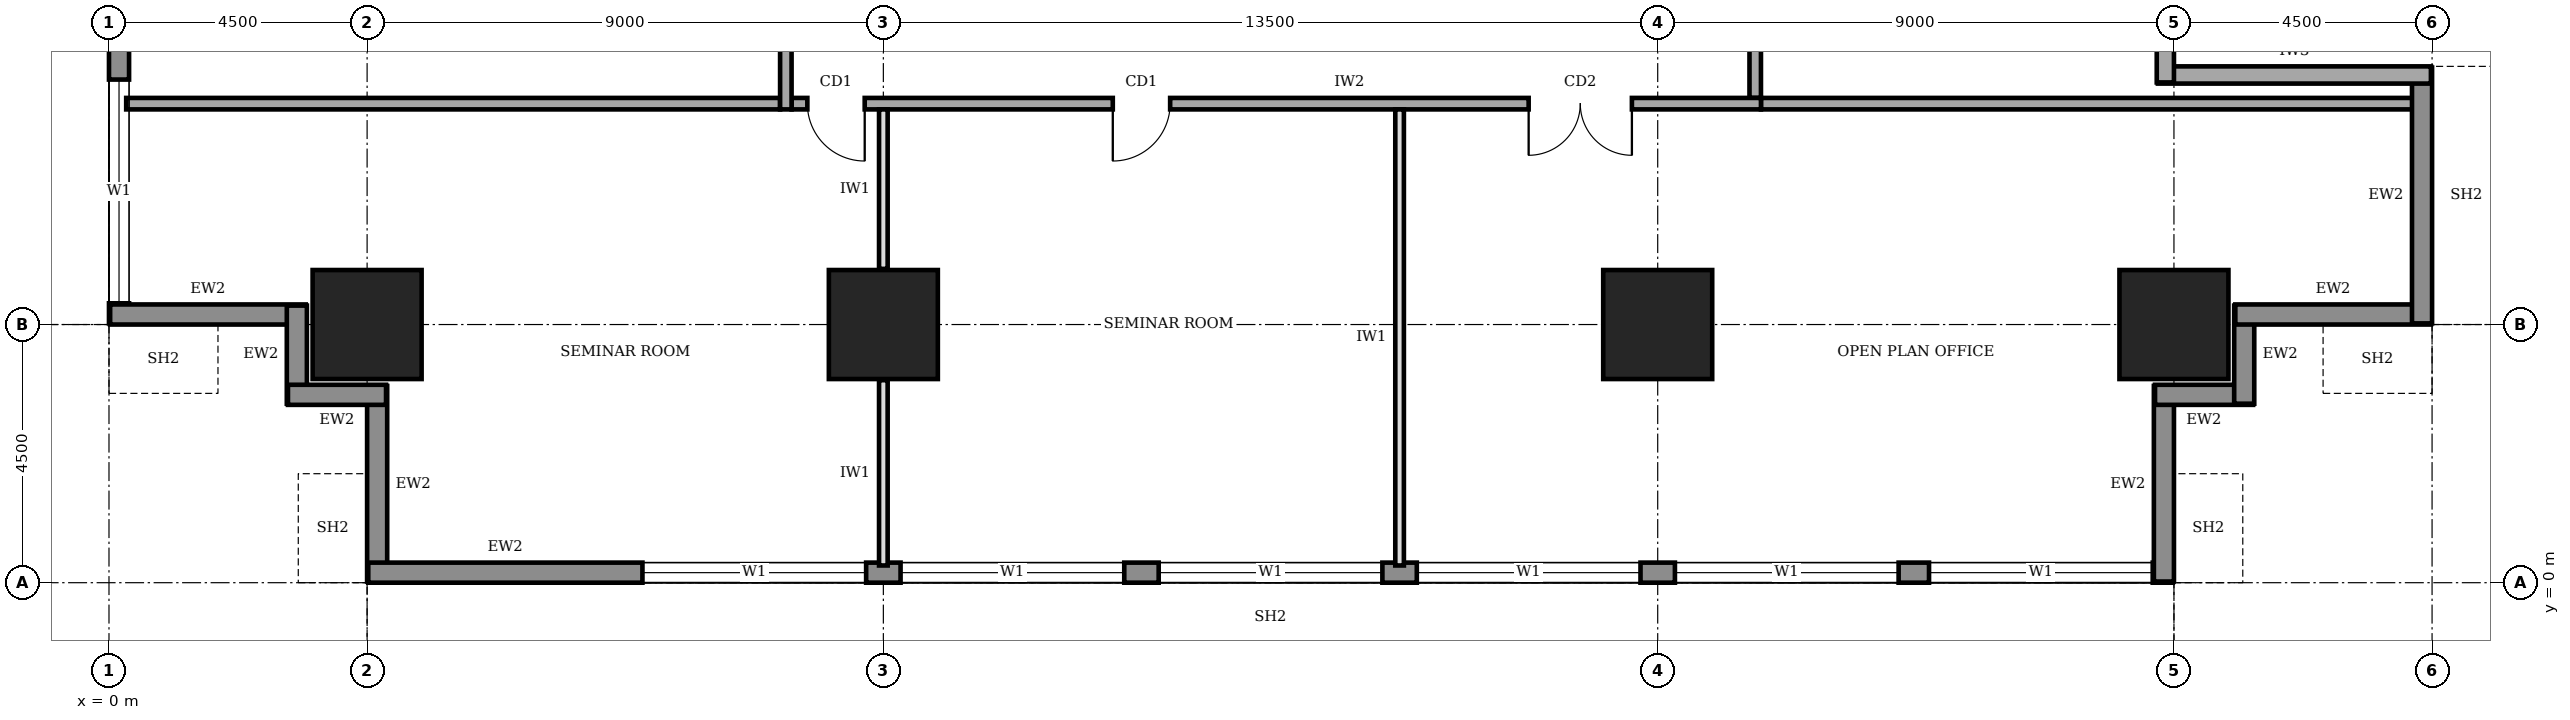
"""IFC4 building model, lengths in metres.
Left out: names, types, materials, properties, quantities, classifications, styles, units other than length and angle.
Written with IfcOpenShell. Run it as: python <this file> out.ifc"""

import sys

from ifc_helpers import new_model, si_unit, direction, frame, frame_2d, origin, origin_2d, place, context, subcontext, project, spatial, rectangle, extrude, element, fill, save


model = new_model("IFC4")
c1 = context("Model", 3, precision=1e-05, world=origin(), true_north=direction((0.0, 1.0)))
c2 = subcontext(c1, "Body", "Model", "MODEL_VIEW")
j1 = project(units=[si_unit("LENGTHUNIT", "METRE"), si_unit("PLANEANGLEUNIT", "RADIAN")], contexts=[c1])
p1 = place(None, origin())
s1 = spatial("IfcSite", under=j1, at=p1, CompositionType="ELEMENT")
p2 = place(p1, origin())
s2 = spatial("IfcBuilding", under=s1, at=p2, CompositionType="ELEMENT")
p3 = place(p2, frame((0.0, 0.0, 105.0)))
s3 = spatial("IfcBuildingStorey", under=s2, at=p3, CompositionType="ELEMENT", Elevation=105.0)
for number, where, z_axis, x_axis in (
    (1, (4.5, 4.5, 0.0), (0.0, 0.0, 1.0), (1.0, 0.0, 0.0)),
    (2, (13.5, 4.5, 0.0), (0.0, 0.0, 1.0), (1.0, 0.0, 0.0)),
    (3, (27.0, 4.5, 0.0), (0.0, 0.0, 1.0), (1.0, 0.0, 0.0)),
    (4, (36.0, 4.5, 0.0), (0.0, 0.0, 1.0), (1.0, 0.0, 0.0)),
):
    element("IfcColumn", number, at=place(p3, frame(where, z_axis=z_axis, x_axis=x_axis)), inside=s3, PredefinedType="COLUMN", context=c2, shape_type="SweptSolid", body=[
        extrude(rectangle(XDim=1.9, YDim=1.9, at=origin_2d()), origin(), (0.0, 0.0, 1.0), 4.0),
    ])
p4 = place(p3, frame((4.675, 3.43, 0.0), z_axis=(0.0, 0.0, 1.0), x_axis=(0.0, -1.0, 0.0)))
e5 = element("IfcWall", 5, at=p4, inside=s3, PredefinedType="STANDARD", context=c2, shape_type="SweptSolid", body=[
    extrude(rectangle(XDim=3.41, YDim=0.35, at=frame_2d((1.705, 0.0))), origin(), (0.0, 0.0, 1.0), 2.85),
])
p5 = place(p3, frame((4.52, 0.175, 0.0), z_axis=(0.0, 0.0, 1.0), x_axis=(1.0, 0.0, 0.0)))
e6 = element("IfcWall", 6, at=p5, inside=s3, PredefinedType="STANDARD", context=c2, shape_type="SweptSolid", body=[
    extrude(rectangle(XDim=31.46, YDim=0.35, at=frame_2d((15.73, 0.0))), origin(), (0.0, 0.0, 1.0), 3.75),
])
p6 = place(p5, frame((4.78, 0.0, 0.9)))
e7 = element("IfcOpeningElement", 7, at=p6, cuts=e6, PredefinedType="OPENING", context=c2, shape_type="SweptSolid", body=[
    extrude(rectangle(XDim=3.9, YDim=2.2, at=frame_2d((1.95, 1.1))), frame((0.0, 0.185, 0.0), z_axis=(0.0, -1.0, 0.0), x_axis=(1.0, 0.0, 0.0)), (0.0, 0.0, 1.0), 0.37),
])
p7 = place(p5, frame((9.28, 0.0, 0.9)))
e8 = element("IfcOpeningElement", 8, at=p7, cuts=e6, PredefinedType="OPENING", context=c2, shape_type="SweptSolid", body=[
    extrude(rectangle(XDim=3.9, YDim=2.2, at=frame_2d((1.95, 1.1))), frame((0.0, 0.185, 0.0), z_axis=(0.0, -1.0, 0.0), x_axis=(1.0, 0.0, 0.0)), (0.0, 0.0, 1.0), 0.37),
])
p8 = place(p5, frame((13.78, 0.0, 0.9)))
e9 = element("IfcOpeningElement", 9, at=p8, cuts=e6, PredefinedType="OPENING", context=c2, shape_type="SweptSolid", body=[
    extrude(rectangle(XDim=3.9, YDim=2.2, at=frame_2d((1.95, 1.1))), frame((0.0, 0.185, 0.0), z_axis=(0.0, -1.0, 0.0), x_axis=(1.0, 0.0, 0.0)), (0.0, 0.0, 1.0), 0.37),
])
p9 = place(p5, frame((18.28, 0.0, 0.9)))
e10 = element("IfcOpeningElement", 10, at=p9, cuts=e6, PredefinedType="OPENING", context=c2, shape_type="SweptSolid", body=[
    extrude(rectangle(XDim=3.9, YDim=2.2, at=frame_2d((1.95, 1.1))), frame((0.0, 0.185, 0.0), z_axis=(0.0, -1.0, 0.0), x_axis=(1.0, 0.0, 0.0)), (0.0, 0.0, 1.0), 0.37),
])
p10 = place(p5, frame((22.78, 0.0, 0.9)))
e11 = element("IfcOpeningElement", 11, at=p10, cuts=e6, PredefinedType="OPENING", context=c2, shape_type="SweptSolid", body=[
    extrude(rectangle(XDim=3.9, YDim=2.2, at=frame_2d((1.95, 1.1))), frame((0.0, 0.185, 0.0), z_axis=(0.0, -1.0, 0.0), x_axis=(1.0, 0.0, 0.0)), (0.0, 0.0, 1.0), 0.37),
])
p11 = place(p5, frame((27.21, 0.0, 0.9)))
e12 = element("IfcOpeningElement", 12, at=p11, cuts=e6, PredefinedType="OPENING", context=c2, shape_type="SweptSolid", body=[
    extrude(rectangle(XDim=3.9, YDim=2.2, at=frame_2d((1.95, 1.1))), frame((0.0, 0.185, 0.0), z_axis=(0.0, -1.0, 0.0), x_axis=(1.0, 0.0, 0.0)), (0.0, 0.0, 1.0), 0.37),
])
p12 = place(p3, frame((35.825, 0.02, 0.0), z_axis=(0.0, 0.0, 1.0), x_axis=(0.0, 1.0, 0.0)))
e13 = element("IfcWall", 13, at=p12, inside=s3, PredefinedType="STANDARD", context=c2, shape_type="SweptSolid", body=[
    extrude(rectangle(XDim=3.41, YDim=0.35, at=frame_2d((1.705, 0.0))), origin(), (0.0, 0.0, 1.0), 2.85),
])
for number, where, z_axis, x_axis in (
    (14, (35.67, 3.275, 0.0), (0.0, 0.0, 1.0), (1.0, 0.0, 0.0)),
    (15, (37.225, 3.12, 0.0), (0.0, 0.0, 1.0), (0.0, 1.0, 0.0)),
):
    element("IfcWall", number, at=place(p3, frame(where, z_axis=z_axis, x_axis=x_axis)), inside=s3, PredefinedType="STANDARD", context=c2, shape_type="SweptSolid", body=[
        extrude(rectangle(XDim=1.71, YDim=0.35, at=frame_2d((0.855, 0.0))), origin(), (0.0, 0.0, 1.0), 3.75),
    ])
p13 = place(p3, frame((37.07, 4.675, 0.0), z_axis=(0.0, 0.0, 1.0), x_axis=(1.0, 0.0, 0.0)))
e16 = element("IfcWall", 16, at=p13, inside=s3, PredefinedType="STANDARD", context=c2, shape_type="SweptSolid", body=[
    extrude(rectangle(XDim=3.41, YDim=0.35, at=frame_2d((1.705, 0.0))), origin(), (0.0, 0.0, 1.0), 2.85),
])
p14 = place(p3, frame((40.325, 4.52, 0.0), z_axis=(0.0, 0.0, 1.0), x_axis=(0.0, 1.0, 0.0)))
e17 = element("IfcWall", 17, at=p14, inside=s3, PredefinedType="STANDARD", context=c2, shape_type="SweptSolid", body=[
    extrude(rectangle(XDim=4.46, YDim=0.35, at=frame_2d((2.23, 0.0))), origin(), (0.0, 0.0, 1.0), 3.75),
])
p15 = place(p3, frame((40.48, 8.85, 0.0), z_axis=(0.0, 0.0, 1.0), x_axis=(-1.0, 0.0, 0.0)))
e18 = element("IfcWall", 18, at=p15, inside=s3, PredefinedType="SOLIDWALL", context=c2, shape_type="SweptSolid", body=[
    extrude(rectangle(XDim=4.76, YDim=0.3, at=frame_2d((2.38, 0.0))), origin(), (0.0, 0.0, 1.0), 3.75),
])
p16 = place(p3, frame((35.85, 8.72, 0.0), z_axis=(0.0, 0.0, 1.0), x_axis=(0.0, 1.0, 0.0)))
e19 = element("IfcWall", 19, at=p16, inside=s3, PredefinedType="SOLIDWALL", context=c2, shape_type="SweptSolid", body=[
    extrude(rectangle(XDim=1.38, YDim=0.3, at=frame_2d((0.69, 0.0))), origin(), (0.0, 0.0, 1.0), 2.65),
])
p17 = place(p3, frame((0.175, 35.98, 0.0), z_axis=(0.0, 0.0, 1.0), x_axis=(0.0, -1.0, 0.0)))
e20 = element("IfcWall", 20, at=p17, inside=s3, PredefinedType="STANDARD", context=c2, shape_type="SweptSolid", body=[
    extrude(rectangle(XDim=31.46, YDim=0.35, at=frame_2d((15.73, 0.0))), origin(), (0.0, 0.0, 1.0), 3.75),
])
p18 = place(p17, frame((27.21, 0.0, 0.9)))
e21 = element("IfcOpeningElement", 21, at=p18, cuts=e20, PredefinedType="OPENING", context=c2, shape_type="SweptSolid", body=[
    extrude(rectangle(XDim=3.9, YDim=2.2, at=frame_2d((1.95, 1.1))), frame((0.0, 0.185, 0.0), z_axis=(0.0, -1.0, 0.0), x_axis=(1.0, 0.0, 0.0)), (0.0, 0.0, 1.0), 0.37),
])
p19 = place(p17, frame((22.78, 0.0, 0.9)))
e22 = element("IfcOpeningElement", 22, at=p19, cuts=e20, PredefinedType="OPENING", context=c2, shape_type="SweptSolid", body=[
    extrude(rectangle(XDim=3.9, YDim=2.2, at=frame_2d((1.95, 1.1))), frame((0.0, 0.185, 0.0), z_axis=(0.0, -1.0, 0.0), x_axis=(1.0, 0.0, 0.0)), (0.0, 0.0, 1.0), 0.37),
])
p20 = place(p17, frame((18.28, 0.0, 0.9)))
e23 = element("IfcOpeningElement", 23, at=p20, cuts=e20, PredefinedType="OPENING", context=c2, shape_type="SweptSolid", body=[
    extrude(rectangle(XDim=3.9, YDim=2.2, at=frame_2d((1.95, 1.1))), frame((0.0, 0.185, 0.0), z_axis=(0.0, -1.0, 0.0), x_axis=(1.0, 0.0, 0.0)), (0.0, 0.0, 1.0), 0.37),
])
p21 = place(p17, frame((13.78, 0.0, 0.9)))
e24 = element("IfcOpeningElement", 24, at=p21, cuts=e20, PredefinedType="OPENING", context=c2, shape_type="SweptSolid", body=[
    extrude(rectangle(XDim=3.9, YDim=2.2, at=frame_2d((1.95, 1.1))), frame((0.0, 0.185, 0.0), z_axis=(0.0, -1.0, 0.0), x_axis=(1.0, 0.0, 0.0)), (0.0, 0.0, 1.0), 0.37),
])
p22 = place(p17, frame((9.28, 0.0, 0.9)))
e25 = element("IfcOpeningElement", 25, at=p22, cuts=e20, PredefinedType="OPENING", context=c2, shape_type="SweptSolid", body=[
    extrude(rectangle(XDim=3.9, YDim=2.2, at=frame_2d((1.95, 1.1))), frame((0.0, 0.185, 0.0), z_axis=(0.0, -1.0, 0.0), x_axis=(1.0, 0.0, 0.0)), (0.0, 0.0, 1.0), 0.37),
])
p23 = place(p17, frame((4.78, 0.0, 0.9)))
e26 = element("IfcOpeningElement", 26, at=p23, cuts=e20, PredefinedType="OPENING", context=c2, shape_type="SweptSolid", body=[
    extrude(rectangle(XDim=3.9, YDim=2.2, at=frame_2d((1.95, 1.1))), frame((0.0, 0.185, 0.0), z_axis=(0.0, -1.0, 0.0), x_axis=(1.0, 0.0, 0.0)), (0.0, 0.0, 1.0), 0.37),
])
p24 = place(p3, frame((0.02, 4.675, 0.0), z_axis=(0.0, 0.0, 1.0), x_axis=(1.0, 0.0, 0.0)))
e27 = element("IfcWall", 27, at=p24, inside=s3, PredefinedType="STANDARD", context=c2, shape_type="SweptSolid", body=[
    extrude(rectangle(XDim=3.41, YDim=0.35, at=frame_2d((1.705, 0.0))), origin(), (0.0, 0.0, 1.0), 2.85),
])
for number, where, z_axis, x_axis in (
    (28, (3.275, 4.83, 0.0), (0.0, 0.0, 1.0), (0.0, -1.0, 0.0)),
    (29, (3.12, 3.275, 0.0), (0.0, 0.0, 1.0), (1.0, 0.0, 0.0)),
):
    element("IfcWall", number, at=place(p3, frame(where, z_axis=z_axis, x_axis=x_axis)), inside=s3, PredefinedType="STANDARD", context=c2, shape_type="SweptSolid", body=[
        extrude(rectangle(XDim=1.71, YDim=0.35, at=frame_2d((0.855, 0.0))), origin(), (0.0, 0.0, 1.0), 3.75),
    ])
p25 = place(p3, frame((11.9, 8.35, 0.0), z_axis=(0.0, 0.0, 1.0), x_axis=(1.0, 0.0, 0.0)))
e30 = element("IfcWall", 30, at=p25, inside=s3, PredefinedType="SOLIDWALL", context=c2, shape_type="SweptSolid", body=[
    extrude(rectangle(XDim=16.9, YDim=0.2, at=frame_2d((8.45, 0.0))), origin(), (0.0, 0.0, 1.0), 3.75),
])
p26 = place(p25, frame((0.275, 0.0, 0.0)))
e31 = element("IfcOpeningElement", 31, at=p26, cuts=e30, PredefinedType="OPENING", context=c2, shape_type="SweptSolid", body=[
    extrude(rectangle(XDim=1.0, YDim=2.1, at=frame_2d((0.5, 1.05))), frame((0.0, 0.11, 0.0), z_axis=(0.0, -1.0, 0.0), x_axis=(1.0, 0.0, 0.0)), (0.0, 0.0, 1.0), 0.22),
])
p27 = place(p25, frame((5.6, 0.0, 0.0)))
e32 = element("IfcOpeningElement", 32, at=p27, cuts=e30, PredefinedType="OPENING", context=c2, shape_type="SweptSolid", body=[
    extrude(rectangle(XDim=1.0, YDim=2.1, at=frame_2d((0.5, 1.05))), frame((0.0, 0.11, 0.0), z_axis=(0.0, -1.0, 0.0), x_axis=(1.0, 0.0, 0.0)), (0.0, 0.0, 1.0), 0.22),
])
p28 = place(p25, frame((12.85, 0.0, 0.0)))
e33 = element("IfcOpeningElement", 33, at=p28, cuts=e30, PredefinedType="OPENING", context=c2, shape_type="SweptSolid", body=[
    extrude(rectangle(XDim=1.8, YDim=2.1, at=frame_2d((0.9, 1.05))), frame((0.0, 0.11, 0.0), z_axis=(0.0, -1.0, 0.0), x_axis=(1.0, 0.0, 0.0)), (0.0, 0.0, 1.0), 0.22),
])
p29 = place(p3, frame((28.7, 8.45, 0.0), z_axis=(0.0, 0.0, 1.0), x_axis=(0.0, 1.0, 0.0)))
e34 = element("IfcWall", 34, at=p29, inside=s3, PredefinedType="SOLIDWALL", context=c2, shape_type="SweptSolid", body=[
    extrude(rectangle(XDim=23.8, YDim=0.2, at=frame_2d((11.9, 0.0))), origin(), (0.0, 0.0, 1.0), 3.75),
])
p30 = place(p29, frame((10.9, 0.0, 0.0)))
e35 = element("IfcOpeningElement", 35, at=p30, cuts=e34, PredefinedType="OPENING", context=c2, shape_type="SweptSolid", body=[
    extrude(rectangle(XDim=1.8, YDim=2.1, at=frame_2d((0.9, 1.05))), frame((0.0, 0.11, 0.0), z_axis=(0.0, -1.0, 0.0), x_axis=(1.0, 0.0, 0.0)), (0.0, 0.0, 1.0), 0.22),
])
p31 = place(p3, frame((11.8, 32.05, 0.0), z_axis=(0.0, 0.0, 1.0), x_axis=(0.0, -1.0, 0.0)))
e36 = element("IfcWall", 36, at=p31, inside=s3, PredefinedType="SOLIDWALL", context=c2, shape_type="SweptSolid", body=[
    extrude(rectangle(XDim=23.8, YDim=0.2, at=frame_2d((11.9, 0.0))), origin(), (0.0, 0.0, 1.0), 3.75),
])
p32 = place(p31, frame((20.675, 0.0, 0.0)))
e37 = element("IfcOpeningElement", 37, at=p32, cuts=e36, PredefinedType="OPENING", context=c2, shape_type="SweptSolid", body=[
    extrude(rectangle(XDim=1.0, YDim=2.1, at=frame_2d((0.5, 1.05))), frame((0.0, 0.11, 0.0), z_axis=(0.0, -1.0, 0.0), x_axis=(1.0, 0.0, 0.0)), (0.0, 0.0, 1.0), 0.22),
])
p33 = place(p31, frame((16.2, 0.0, 0.0)))
e38 = element("IfcOpeningElement", 38, at=p33, cuts=e36, PredefinedType="OPENING", context=c2, shape_type="SweptSolid", body=[
    extrude(rectangle(XDim=0.9, YDim=2.1, at=frame_2d((0.45, 1.05))), frame((0.0, 0.11, 0.0), z_axis=(0.0, -1.0, 0.0), x_axis=(1.0, 0.0, 0.0)), (0.0, 0.0, 1.0), 0.22),
])
p34 = place(p31, frame((13.2, 0.0, 0.0)))
e39 = element("IfcOpeningElement", 39, at=p34, cuts=e36, PredefinedType="OPENING", context=c2, shape_type="SweptSolid", body=[
    extrude(rectangle(XDim=0.9, YDim=2.1, at=frame_2d((0.45, 1.05))), frame((0.0, 0.11, 0.0), z_axis=(0.0, -1.0, 0.0), x_axis=(1.0, 0.0, 0.0)), (0.0, 0.0, 1.0), 0.22),
])
p35 = place(p31, frame((8.35, 0.0, 0.0)))
e40 = element("IfcOpeningElement", 40, at=p35, cuts=e36, PredefinedType="OPENING", context=c2, shape_type="SweptSolid", body=[
    extrude(rectangle(XDim=0.9, YDim=2.1, at=frame_2d((0.45, 1.05))), frame((0.0, 0.11, 0.0), z_axis=(0.0, -1.0, 0.0), x_axis=(1.0, 0.0, 0.0)), (0.0, 0.0, 1.0), 0.22),
])
p36 = place(p31, frame((5.55, 0.0, 0.0)))
e41 = element("IfcOpeningElement", 41, at=p36, cuts=e36, PredefinedType="OPENING", context=c2, shape_type="SweptSolid", body=[
    extrude(rectangle(XDim=1.0, YDim=2.1, at=frame_2d((0.5, 1.05))), frame((0.0, 0.11, 0.0), z_axis=(0.0, -1.0, 0.0), x_axis=(1.0, 0.0, 0.0)), (0.0, 0.0, 1.0), 0.22),
])
p37 = place(p31, frame((11.05, 0.0, 0.0)))
e42 = element("IfcOpeningElement", 42, at=p37, cuts=e36, PredefinedType="OPENING", context=c2, shape_type="SweptSolid", body=[
    extrude(rectangle(XDim=1.0, YDim=2.1, at=frame_2d((0.5, 1.05))), frame((0.0, 0.11, 0.0), z_axis=(0.0, -1.0, 0.0), x_axis=(1.0, 0.0, 0.0)), (0.0, 0.0, 1.0), 0.22),
])
p38 = place(p31, frame((1.925, 0.0, 0.0)))
e43 = element("IfcOpeningElement", 43, at=p38, cuts=e36, PredefinedType="OPENING", context=c2, shape_type="SweptSolid", body=[
    extrude(rectangle(XDim=1.0, YDim=2.1, at=frame_2d((0.5, 1.05))), frame((0.0, 0.11, 0.0), z_axis=(0.0, -1.0, 0.0), x_axis=(1.0, 0.0, 0.0)), (0.0, 0.0, 1.0), 0.22),
])
for number, where, z_axis, x_axis in (
    (44, (0.3, 8.35, 0.0), (0.0, 0.0, 1.0), (1.0, 0.0, 0.0)),
    (45, (28.8, 8.35, 0.0), (0.0, 0.0, 1.0), (1.0, 0.0, 0.0)),
):
    element("IfcWall", number, at=place(p3, frame(where, z_axis=z_axis, x_axis=x_axis)), inside=s3, PredefinedType="SOLIDWALL", context=c2, shape_type="SweptSolid", body=[
        extrude(rectangle(XDim=11.4, YDim=0.2, at=frame_2d((5.7, 0.0))), origin(), (0.0, 0.0, 1.0), 3.75),
    ])
p39 = place(p3, frame((13.5, 0.3, 0.0), z_axis=(0.0, 0.0, 1.0), x_axis=(0.0, 1.0, 0.0)))
e46 = element("IfcWall", 46, at=p39, inside=s3, PredefinedType="PARTITIONING", context=c2, shape_type="SweptSolid", body=[
    extrude(rectangle(XDim=3.23, YDim=0.15, at=frame_2d((1.615, 0.0))), origin(), (0.0, 0.0, 1.0), 2.85),
])
p40 = place(p3, frame((13.5, 5.47, 0.0), z_axis=(0.0, 0.0, 1.0), x_axis=(0.0, 1.0, 0.0)))
e47 = element("IfcWall", 47, at=p40, inside=s3, PredefinedType="PARTITIONING", context=c2, shape_type="SweptSolid", body=[
    extrude(rectangle(XDim=2.78, YDim=0.15, at=frame_2d((1.39, 0.0))), origin(), (0.0, 0.0, 1.0), 2.85),
])
p41 = place(p3, frame((22.5, 0.3, 0.0), z_axis=(0.0, 0.0, 1.0), x_axis=(0.0, 1.0, 0.0)))
e48 = element("IfcWall", 48, at=p41, inside=s3, PredefinedType="PARTITIONING", context=c2, shape_type="SweptSolid", body=[
    extrude(rectangle(XDim=7.95, YDim=0.15, at=frame_2d((3.975, 0.0))), origin(), (0.0, 0.0, 1.0), 3.75),
])
p42 = place(p6, origin())
e49 = element("IfcWindow", 49, at=p42, inside=s3, PartitioningType="SINGLE_PANEL", PredefinedType="WINDOW", context=c2, shape_type="SweptSolid", body=[
    extrude(rectangle(XDim=3.9, YDim=2.2, at=frame_2d((1.95, 1.1))), frame((0.0, 0.03, 0.0), z_axis=(0.0, -1.0, 0.0), x_axis=(1.0, 0.0, 0.0)), (0.0, 0.0, 1.0), 0.06),
])
fill(e7, e49)
p43 = place(p7, origin())
e50 = element("IfcWindow", 50, at=p43, inside=s3, PartitioningType="SINGLE_PANEL", PredefinedType="WINDOW", context=c2, shape_type="SweptSolid", body=[
    extrude(rectangle(XDim=3.9, YDim=2.2, at=frame_2d((1.95, 1.1))), frame((0.0, 0.03, 0.0), z_axis=(0.0, -1.0, 0.0), x_axis=(1.0, 0.0, 0.0)), (0.0, 0.0, 1.0), 0.06),
])
fill(e8, e50)
p44 = place(p8, origin())
e51 = element("IfcWindow", 51, at=p44, inside=s3, PartitioningType="SINGLE_PANEL", PredefinedType="WINDOW", context=c2, shape_type="SweptSolid", body=[
    extrude(rectangle(XDim=3.9, YDim=2.2, at=frame_2d((1.95, 1.1))), frame((0.0, 0.03, 0.0), z_axis=(0.0, -1.0, 0.0), x_axis=(1.0, 0.0, 0.0)), (0.0, 0.0, 1.0), 0.06),
])
fill(e9, e51)
p45 = place(p9, origin())
e52 = element("IfcWindow", 52, at=p45, inside=s3, PartitioningType="SINGLE_PANEL", PredefinedType="WINDOW", context=c2, shape_type="SweptSolid", body=[
    extrude(rectangle(XDim=3.9, YDim=2.2, at=frame_2d((1.95, 1.1))), frame((0.0, 0.03, 0.0), z_axis=(0.0, -1.0, 0.0), x_axis=(1.0, 0.0, 0.0)), (0.0, 0.0, 1.0), 0.06),
])
fill(e10, e52)
p46 = place(p10, origin())
e53 = element("IfcWindow", 53, at=p46, inside=s3, PartitioningType="SINGLE_PANEL", PredefinedType="WINDOW", context=c2, shape_type="SweptSolid", body=[
    extrude(rectangle(XDim=3.9, YDim=2.2, at=frame_2d((1.95, 1.1))), frame((0.0, 0.03, 0.0), z_axis=(0.0, -1.0, 0.0), x_axis=(1.0, 0.0, 0.0)), (0.0, 0.0, 1.0), 0.06),
])
fill(e11, e53)
p47 = place(p11, origin())
e54 = element("IfcWindow", 54, at=p47, inside=s3, PartitioningType="SINGLE_PANEL", PredefinedType="WINDOW", context=c2, shape_type="SweptSolid", body=[
    extrude(rectangle(XDim=3.9, YDim=2.2, at=frame_2d((1.95, 1.1))), frame((0.0, 0.03, 0.0), z_axis=(0.0, -1.0, 0.0), x_axis=(1.0, 0.0, 0.0)), (0.0, 0.0, 1.0), 0.06),
])
fill(e12, e54)
p48 = place(p18, origin())
e55 = element("IfcWindow", 55, at=p48, inside=s3, PartitioningType="SINGLE_PANEL", PredefinedType="WINDOW", context=c2, shape_type="SweptSolid", body=[
    extrude(rectangle(XDim=3.9, YDim=2.2, at=frame_2d((1.95, 1.1))), frame((0.0, 0.03, 0.0), z_axis=(0.0, -1.0, 0.0), x_axis=(1.0, 0.0, 0.0)), (0.0, 0.0, 1.0), 0.06),
])
fill(e21, e55)
p49 = place(p26, frame((1.0, 0.0, 0.0), z_axis=(0.0, 0.0, 1.0), x_axis=(-1.0, 0.0, 0.0)))
e56 = element("IfcDoor", 56, at=p49, inside=s3, OperationType="SINGLE_SWING_LEFT", PredefinedType="DOOR", context=c2, shape_type="SweptSolid", body=[
    extrude(rectangle(XDim=1.0, YDim=2.1, at=frame_2d((0.5, 1.05))), frame((0.0, 0.025, 0.0), z_axis=(0.0, -1.0, 0.0), x_axis=(1.0, 0.0, 0.0)), (0.0, 0.0, 1.0), 0.05),
])
fill(e31, e56)
p50 = place(p27, frame((1.0, 0.0, 0.0), z_axis=(0.0, 0.0, 1.0), x_axis=(-1.0, 0.0, 0.0)))
e57 = element("IfcDoor", 57, at=p50, inside=s3, OperationType="SINGLE_SWING_RIGHT", PredefinedType="DOOR", context=c2, shape_type="SweptSolid", body=[
    extrude(rectangle(XDim=1.0, YDim=2.1, at=frame_2d((0.5, 1.05))), frame((0.0, 0.025, 0.0), z_axis=(0.0, -1.0, 0.0), x_axis=(1.0, 0.0, 0.0)), (0.0, 0.0, 1.0), 0.05),
])
fill(e32, e57)
p51 = place(p28, frame((1.8, 0.0, 0.0), z_axis=(0.0, 0.0, 1.0), x_axis=(-1.0, 0.0, 0.0)))
e58 = element("IfcDoor", 58, at=p51, inside=s3, OperationType="DOUBLE_DOOR_SINGLE_SWING", PredefinedType="DOOR", context=c2, shape_type="SweptSolid", body=[
    extrude(rectangle(XDim=1.8, YDim=2.1, at=frame_2d((0.9, 1.05))), frame((0.0, 0.025, 0.0), z_axis=(0.0, -1.0, 0.0), x_axis=(1.0, 0.0, 0.0)), (0.0, 0.0, 1.0), 0.05),
])
fill(e33, e58)
save(model, sys.argv[1])
